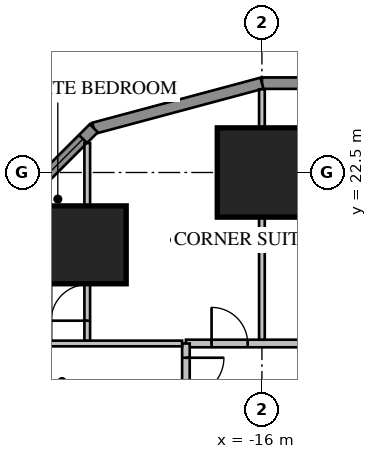
"""IFC4 building model, lengths in metres.
Left out: names, types, materials, properties, quantities, classifications, styles, units other than length and angle.
Written with IfcOpenShell. Run it as: python <this file> out.ifc"""

import sys

from ifc_helpers import new_model, si_unit, direction, frame, frame_2d, origin, origin_2d, place, context, subcontext, project, spatial, rectangle, extrude, element, fill, save


model = new_model("IFC4")
c1 = context("Model", 3, precision=1e-05, world=origin(), true_north=direction((0.0, 1.0)))
c2 = subcontext(c1, "Body", "Model", "MODEL_VIEW")
j1 = project(units=[si_unit("LENGTHUNIT", "METRE"), si_unit("PLANEANGLEUNIT", "RADIAN")], contexts=[c1])
p1 = place(None, origin())
s1 = spatial("IfcSite", under=j1, at=p1, CompositionType="ELEMENT")
p2 = place(p1, origin())
s2 = spatial("IfcBuilding", under=s1, at=p2, CompositionType="ELEMENT")
p3 = place(p2, frame((0.0, 0.0, 23.7)))
s3 = spatial("IfcBuildingStorey", under=s2, at=p3, CompositionType="ELEMENT", Elevation=23.7)
p4 = place(p3, frame((-16.0, 22.5, 0.0), z_axis=(0.0, 0.0, 1.0), x_axis=(1.0, 0.0, 0.0)))
e1 = element("IfcColumn", 1, at=p4, inside=s3, PredefinedType="COLUMN", context=c2, shape_type="SweptSolid", body=[
    extrude(rectangle(XDim=2.35, YDim=2.35, at=origin_2d()), origin(), (0.0, 0.0, 1.0), 3.85),
])
p5 = place(p3, frame((-20.596, 20.596, 0.0), z_axis=(0.0, 0.0, 1.0), x_axis=(1.0, 0.0, 0.0)))
e2 = element("IfcColumn", 2, at=p5, inside=s3, PredefinedType="COLUMN", context=c2, shape_type="SweptSolid", body=[
    extrude(rectangle(XDim=2.05, YDim=2.05, at=origin_2d()), origin(), (0.0, 0.0, 1.0), 3.85),
])
p6 = place(p3, frame((16.0, 24.85, 0.0), z_axis=(0.0, 0.0, 1.0), x_axis=(-1.0, 0.0, 0.0)))
e3 = element("IfcWall", 3, at=p6, inside=s3, PredefinedType="SOLIDWALL", context=c2, shape_type="SweptSolid", body=[
    extrude(rectangle(XDim=32.0, YDim=0.3, at=frame_2d((16.0, 0.0))), origin(), (0.0, 0.0, 1.0), 3.65),
])
p7 = place(p6, frame((1.2, 0.0, 0.75)))
e4 = element("IfcOpeningElement", 4, at=p7, cuts=e3, PredefinedType="OPENING", context=c2, shape_type="SweptSolid", body=[
    extrude(rectangle(XDim=1.6, YDim=1.8, at=frame_2d((0.8, 0.9))), frame((0.0, 0.17, 0.0), z_axis=(0.0, -1.0, 0.0), x_axis=(1.0, 0.0, 0.0)), (0.0, 0.0, 1.0), 0.34),
])
p8 = place(p6, frame((5.2, 0.0, 0.75)))
e5 = element("IfcOpeningElement", 5, at=p8, cuts=e3, PredefinedType="OPENING", context=c2, shape_type="SweptSolid", body=[
    extrude(rectangle(XDim=1.6, YDim=1.8, at=frame_2d((0.8, 0.9))), frame((0.0, 0.17, 0.0), z_axis=(0.0, -1.0, 0.0), x_axis=(1.0, 0.0, 0.0)), (0.0, 0.0, 1.0), 0.34),
])
p9 = place(p6, frame((17.2, 0.0, 0.75)))
e6 = element("IfcOpeningElement", 6, at=p9, cuts=e3, PredefinedType="OPENING", context=c2, shape_type="SweptSolid", body=[
    extrude(rectangle(XDim=1.6, YDim=1.8, at=frame_2d((0.8, 0.9))), frame((0.0, 0.17, 0.0), z_axis=(0.0, -1.0, 0.0), x_axis=(1.0, 0.0, 0.0)), (0.0, 0.0, 1.0), 0.34),
])
p10 = place(p6, frame((21.2, 0.0, 0.75)))
e7 = element("IfcOpeningElement", 7, at=p10, cuts=e3, PredefinedType="OPENING", context=c2, shape_type="SweptSolid", body=[
    extrude(rectangle(XDim=1.6, YDim=1.8, at=frame_2d((0.8, 0.9))), frame((0.0, 0.17, 0.0), z_axis=(0.0, -1.0, 0.0), x_axis=(1.0, 0.0, 0.0)), (0.0, 0.0, 1.0), 0.34),
])
p11 = place(p6, frame((25.2, 0.0, 0.75)))
e8 = element("IfcOpeningElement", 8, at=p11, cuts=e3, PredefinedType="OPENING", context=c2, shape_type="SweptSolid", body=[
    extrude(rectangle(XDim=1.6, YDim=1.8, at=frame_2d((0.8, 0.9))), frame((0.0, 0.17, 0.0), z_axis=(0.0, -1.0, 0.0), x_axis=(1.0, 0.0, 0.0)), (0.0, 0.0, 1.0), 0.34),
])
p12 = place(p6, frame((29.2, 0.0, 0.75)))
e9 = element("IfcOpeningElement", 9, at=p12, cuts=e3, PredefinedType="OPENING", context=c2, shape_type="SweptSolid", body=[
    extrude(rectangle(XDim=1.6, YDim=1.8, at=frame_2d((0.8, 0.9))), frame((0.0, 0.17, 0.0), z_axis=(0.0, -1.0, 0.0), x_axis=(1.0, 0.0, 0.0)), (0.0, 0.0, 1.0), 0.34),
])
p13 = place(p6, frame((8.8, 0.0, 0.75)))
e10 = element("IfcOpeningElement", 10, at=p13, cuts=e3, PredefinedType="OPENING", context=c2, shape_type="SweptSolid", body=[
    extrude(rectangle(XDim=2.4, YDim=1.8, at=frame_2d((1.2, 0.9))), frame((0.0, 0.17, 0.0), z_axis=(0.0, -1.0, 0.0), x_axis=(1.0, 0.0, 0.0)), (0.0, 0.0, 1.0), 0.34),
])
p14 = place(p6, frame((13.812, 0.0, 0.0)))
e11 = element("IfcOpeningElement", 11, at=p14, cuts=e3, PredefinedType="OPENING", context=c2, shape_type="SweptSolid", body=[
    extrude(rectangle(XDim=1.0, YDim=2.4, at=frame_2d((0.5, 1.2))), frame((0.0, 0.17, 0.0), z_axis=(0.0, -1.0, 0.0), x_axis=(1.0, 0.0, 0.0)), (0.0, 0.0, 1.0), 0.34),
])
p15 = place(p3, frame((-16.0, 24.85, 0.0), z_axis=(0.0, 0.0, 1.0), x_axis=(-0.965920218567, -0.258839972501, 0.0)))
e12 = element("IfcWall", 12, at=p15, inside=s3, PredefinedType="SOLIDWALL", context=c2, shape_type="SweptSolid", body=[
    extrude(rectangle(XDim=4.581, YDim=0.3, at=frame_2d((2.291, 0.0))), origin(), (0.0, 0.0, 1.0), 3.65),
])
p16 = place(p3, frame((-20.425, 23.664, 0.0), z_axis=(0.0, 0.0, 1.0), x_axis=(-0.707106781187, -0.707106781187, 0.0)))
e13 = element("IfcWall", 13, at=p16, inside=s3, PredefinedType="SOLIDWALL", context=c2, shape_type="SweptSolid", body=[
    extrude(rectangle(XDim=4.581, YDim=0.3, at=frame_2d((2.291, 0.0))), origin(), (0.0, 0.0, 1.0), 3.65),
])
p17 = place(p16, frame((0.4, 0.0, 0.75)))
e14 = element("IfcOpeningElement", 14, at=p17, cuts=e13, PredefinedType="OPENING", context=c2, shape_type="SweptSolid", body=[
    extrude(rectangle(XDim=3.781, YDim=1.8, at=frame_2d((1.891, 0.9))), frame((0.0, 0.17, 0.0), z_axis=(0.0, -1.0, 0.0), x_axis=(1.0, 0.0, 0.0)), (0.0, 0.0, 1.0), 0.34),
])
p18 = place(p3, frame((18.0, 18.0, 0.0), z_axis=(0.0, 0.0, 1.0), x_axis=(-1.0, 0.0, 0.0)))
e15 = element("IfcWall", 15, at=p18, inside=s3, PredefinedType="PARTITIONING", context=c2, shape_type="SweptSolid", body=[
    extrude(rectangle(XDim=36.0, YDim=0.2, at=frame_2d((18.0, 0.0))), origin(), (0.0, 0.0, 1.0), 3.65),
])
p19 = place(p18, frame((0.375, 0.0, 0.0)))
e16 = element("IfcOpeningElement", 16, at=p19, cuts=e15, PredefinedType="OPENING", context=c2, shape_type="SweptSolid", body=[
    extrude(rectangle(XDim=1.0, YDim=2.1, at=frame_2d((0.5, 1.05))), frame((0.0, 0.12, 0.0), z_axis=(0.0, -1.0, 0.0), x_axis=(1.0, 0.0, 0.0)), (0.0, 0.0, 1.0), 0.24),
])
p20 = place(p18, frame((3.8, 0.0, 0.0)))
e17 = element("IfcOpeningElement", 17, at=p20, cuts=e15, PredefinedType="OPENING", context=c2, shape_type="SweptSolid", body=[
    extrude(rectangle(XDim=0.95, YDim=2.1, at=frame_2d((0.475, 1.05))), frame((0.0, 0.12, 0.0), z_axis=(0.0, -1.0, 0.0), x_axis=(1.0, 0.0, 0.0)), (0.0, 0.0, 1.0), 0.24),
])
p21 = place(p18, frame((7.8, 0.0, 0.0)))
e18 = element("IfcOpeningElement", 18, at=p21, cuts=e15, PredefinedType="OPENING", context=c2, shape_type="SweptSolid", body=[
    extrude(rectangle(XDim=0.95, YDim=2.1, at=frame_2d((0.475, 1.05))), frame((0.0, 0.12, 0.0), z_axis=(0.0, -1.0, 0.0), x_axis=(1.0, 0.0, 0.0)), (0.0, 0.0, 1.0), 0.24),
])
p22 = place(p18, frame((19.8, 0.0, 0.0)))
e19 = element("IfcOpeningElement", 19, at=p22, cuts=e15, PredefinedType="OPENING", context=c2, shape_type="SweptSolid", body=[
    extrude(rectangle(XDim=0.95, YDim=2.1, at=frame_2d((0.475, 1.05))), frame((0.0, 0.12, 0.0), z_axis=(0.0, -1.0, 0.0), x_axis=(1.0, 0.0, 0.0)), (0.0, 0.0, 1.0), 0.24),
])
p23 = place(p18, frame((23.8, 0.0, 0.0)))
e20 = element("IfcOpeningElement", 20, at=p23, cuts=e15, PredefinedType="OPENING", context=c2, shape_type="SweptSolid", body=[
    extrude(rectangle(XDim=0.95, YDim=2.1, at=frame_2d((0.475, 1.05))), frame((0.0, 0.12, 0.0), z_axis=(0.0, -1.0, 0.0), x_axis=(1.0, 0.0, 0.0)), (0.0, 0.0, 1.0), 0.24),
])
p24 = place(p18, frame((27.8, 0.0, 0.0)))
e21 = element("IfcOpeningElement", 21, at=p24, cuts=e15, PredefinedType="OPENING", context=c2, shape_type="SweptSolid", body=[
    extrude(rectangle(XDim=0.95, YDim=2.1, at=frame_2d((0.475, 1.05))), frame((0.0, 0.12, 0.0), z_axis=(0.0, -1.0, 0.0), x_axis=(1.0, 0.0, 0.0)), (0.0, 0.0, 1.0), 0.24),
])
p25 = place(p18, frame((31.8, 0.0, 0.0)))
e22 = element("IfcOpeningElement", 22, at=p25, cuts=e15, PredefinedType="OPENING", context=c2, shape_type="SweptSolid", body=[
    extrude(rectangle(XDim=0.95, YDim=2.1, at=frame_2d((0.475, 1.05))), frame((0.0, 0.12, 0.0), z_axis=(0.0, -1.0, 0.0), x_axis=(1.0, 0.0, 0.0)), (0.0, 0.0, 1.0), 0.24),
])
p26 = place(p18, frame((34.375, 0.0, 0.0)))
e23 = element("IfcOpeningElement", 23, at=p26, cuts=e15, PredefinedType="OPENING", context=c2, shape_type="SweptSolid", body=[
    extrude(rectangle(XDim=0.95, YDim=2.1, at=frame_2d((0.475, 1.05))), frame((0.0, 0.12, 0.0), z_axis=(0.0, -1.0, 0.0), x_axis=(1.0, 0.0, 0.0)), (0.0, 0.0, 1.0), 0.24),
])
p27 = place(p18, frame((11.2, 0.0, 0.0)))
e24 = element("IfcOpeningElement", 24, at=p27, cuts=e15, PredefinedType="OPENING", context=c2, shape_type="SweptSolid", body=[
    extrude(rectangle(XDim=1.0, YDim=2.1, at=frame_2d((0.5, 1.05))), frame((0.0, 0.12, 0.0), z_axis=(0.0, -1.0, 0.0), x_axis=(1.0, 0.0, 0.0)), (0.0, 0.0, 1.0), 0.24),
])
p28 = place(p3, frame((-16.0, 18.1, 0.0), z_axis=(0.0, 0.0, 1.0), x_axis=(0.0, 1.0, 0.0)))
e25 = element("IfcWall", 25, at=p28, inside=s3, PredefinedType="PARTITIONING", context=c2, shape_type="SweptSolid", body=[
    extrude(rectangle(XDim=6.589, YDim=0.15, at=frame_2d((3.295, 0.0))), origin(), (0.0, 0.0, 1.0), 3.65),
])
p29 = place(p3, frame((-20.596, 18.065, 0.0), z_axis=(0.0, 0.0, 1.0), x_axis=(0.0, 1.0, 0.0)))
e26 = element("IfcWall", 26, at=p29, inside=s3, PredefinedType="PARTITIONING", context=c2, shape_type="SweptSolid", body=[
    extrude(rectangle(XDim=5.209, YDim=0.15, at=frame_2d((2.604, 0.0))), origin(), (0.0, 0.0, 1.0), 3.65),
])
p30 = place(p29, frame((0.535, 0.0, 0.0)))
e27 = element("IfcOpeningElement", 27, at=p30, cuts=e26, PredefinedType="OPENING", context=c2, shape_type="SweptSolid", body=[
    extrude(rectangle(XDim=0.95, YDim=2.1, at=frame_2d((0.475, 1.05))), frame((0.0, 0.095, 0.0), z_axis=(0.0, -1.0, 0.0), x_axis=(1.0, 0.0, 0.0)), (0.0, 0.0, 1.0), 0.19),
])
p31 = place(p3, frame((-18.0, 18.0, 0.0), z_axis=(0.0, 0.0, 1.0), x_axis=(0.0, -1.0, 0.0)))
e28 = element("IfcWall", 28, at=p31, inside=s3, PredefinedType="PARTITIONING", context=c2, shape_type="SweptSolid", body=[
    extrude(rectangle(XDim=36.0, YDim=0.2, at=frame_2d((18.0, 0.0))), origin(), (0.0, 0.0, 1.0), 3.65),
])
p32 = place(p31, frame((10.4, 0.0, 0.0)))
e29 = element("IfcOpeningElement", 29, at=p32, cuts=e28, PredefinedType="OPENING", context=c2, shape_type="SweptSolid", body=[
    extrude(rectangle(XDim=1.0, YDim=2.1, at=frame_2d((0.5, 1.05))), frame((0.0, 0.12, 0.0), z_axis=(0.0, -1.0, 0.0), x_axis=(1.0, 0.0, 0.0)), (0.0, 0.0, 1.0), 0.24),
])
p33 = place(p31, frame((14.4, 0.0, 0.0)))
e30 = element("IfcOpeningElement", 30, at=p33, cuts=e28, PredefinedType="OPENING", context=c2, shape_type="SweptSolid", body=[
    extrude(rectangle(XDim=1.0, YDim=2.1, at=frame_2d((0.5, 1.05))), frame((0.0, 0.12, 0.0), z_axis=(0.0, -1.0, 0.0), x_axis=(1.0, 0.0, 0.0)), (0.0, 0.0, 1.0), 0.24),
])
p34 = place(p31, frame((0.375, 0.0, 0.0)))
e31 = element("IfcOpeningElement", 31, at=p34, cuts=e28, PredefinedType="OPENING", context=c2, shape_type="SweptSolid", body=[
    extrude(rectangle(XDim=1.0, YDim=2.1, at=frame_2d((0.5, 1.05))), frame((0.0, 0.12, 0.0), z_axis=(0.0, -1.0, 0.0), x_axis=(1.0, 0.0, 0.0)), (0.0, 0.0, 1.0), 0.24),
])
p35 = place(p31, frame((34.375, 0.0, 0.0)))
e32 = element("IfcOpeningElement", 32, at=p35, cuts=e28, PredefinedType="OPENING", context=c2, shape_type="SweptSolid", body=[
    extrude(rectangle(XDim=0.95, YDim=2.1, at=frame_2d((0.475, 1.05))), frame((0.0, 0.12, 0.0), z_axis=(0.0, -1.0, 0.0), x_axis=(1.0, 0.0, 0.0)), (0.0, 0.0, 1.0), 0.24),
])
p36 = place(p3, frame((-18.1, 18.0, 0.0), z_axis=(0.0, 0.0, 1.0), x_axis=(-1.0, 0.0, 0.0)))
e33 = element("IfcWall", 33, at=p36, inside=s3, PredefinedType="PARTITIONING", context=c2, shape_type="SweptSolid", body=[
    extrude(rectangle(XDim=6.053, YDim=0.15, at=frame_2d((3.027, 0.0))), origin(), (0.0, 0.0, 1.0), 3.65),
])
p37 = place(p3, frame((-13.625, 20.75, 0.0), z_axis=(0.0, 0.0, 1.0), x_axis=(-1.0, 0.0, 0.0)))
e34 = element("IfcWall", 34, at=p37, inside=s3, PredefinedType="PARTITIONING", context=c2, shape_type="SweptSolid", body=[
    extrude(rectangle(XDim=2.3, YDim=0.1, at=frame_2d((1.15, 0.0))), origin(), (0.0, 0.0, 1.0), 3.65),
])
p38 = place(p37, frame((0.2, 0.0, 0.0)))
e35 = element("IfcOpeningElement", 35, at=p38, cuts=e34, PredefinedType="OPENING", context=c2, shape_type="SweptSolid", body=[
    extrude(rectangle(XDim=0.9, YDim=2.1, at=frame_2d((0.45, 1.05))), frame((0.0, 0.07, 0.0), z_axis=(0.0, -1.0, 0.0), x_axis=(1.0, 0.0, 0.0)), (0.0, 0.0, 1.0), 0.14),
])
p39 = place(p17, origin())
e36 = element("IfcWindow", 36, at=p39, inside=s3, PartitioningType="SINGLE_PANEL", PredefinedType="WINDOW", context=c2, shape_type="SweptSolid", body=[
    extrude(rectangle(XDim=3.781, YDim=1.8, at=frame_2d((1.891, 0.9))), frame((0.0, 0.03, 0.0), z_axis=(0.0, -1.0, 0.0), x_axis=(1.0, 0.0, 0.0)), (0.0, 0.0, 1.0), 0.06),
])
fill(e14, e36)
p40 = place(p26, origin())
e37 = element("IfcDoor", 37, at=p40, inside=s3, OperationType="SINGLE_SWING_RIGHT", PredefinedType="DOOR", context=c2, shape_type="SweptSolid", body=[
    extrude(rectangle(XDim=0.95, YDim=2.1, at=frame_2d((0.475, 1.05))), frame((0.0, 0.025, 0.0), z_axis=(0.0, -1.0, 0.0), x_axis=(1.0, 0.0, 0.0)), (0.0, 0.0, 1.0), 0.05),
])
fill(e23, e37)
p41 = place(p30, origin())
e38 = element("IfcDoor", 38, at=p41, inside=s3, OperationType="SINGLE_SWING_LEFT", PredefinedType="DOOR", context=c2, shape_type="SweptSolid", body=[
    extrude(rectangle(XDim=0.95, YDim=2.1, at=frame_2d((0.475, 1.05))), frame((0.0, 0.025, 0.0), z_axis=(0.0, -1.0, 0.0), x_axis=(1.0, 0.0, 0.0)), (0.0, 0.0, 1.0), 0.05),
])
fill(e27, e38)
p42 = place(p34, origin())
e39 = element("IfcDoor", 39, at=p42, inside=s3, OperationType="SINGLE_SWING_LEFT", PredefinedType="DOOR", context=c2, shape_type="SweptSolid", body=[
    extrude(rectangle(XDim=1.0, YDim=2.1, at=frame_2d((0.5, 1.05))), frame((0.0, 0.025, 0.0), z_axis=(0.0, -1.0, 0.0), x_axis=(1.0, 0.0, 0.0)), (0.0, 0.0, 1.0), 0.05),
])
fill(e31, e39)
save(model, sys.argv[1])
